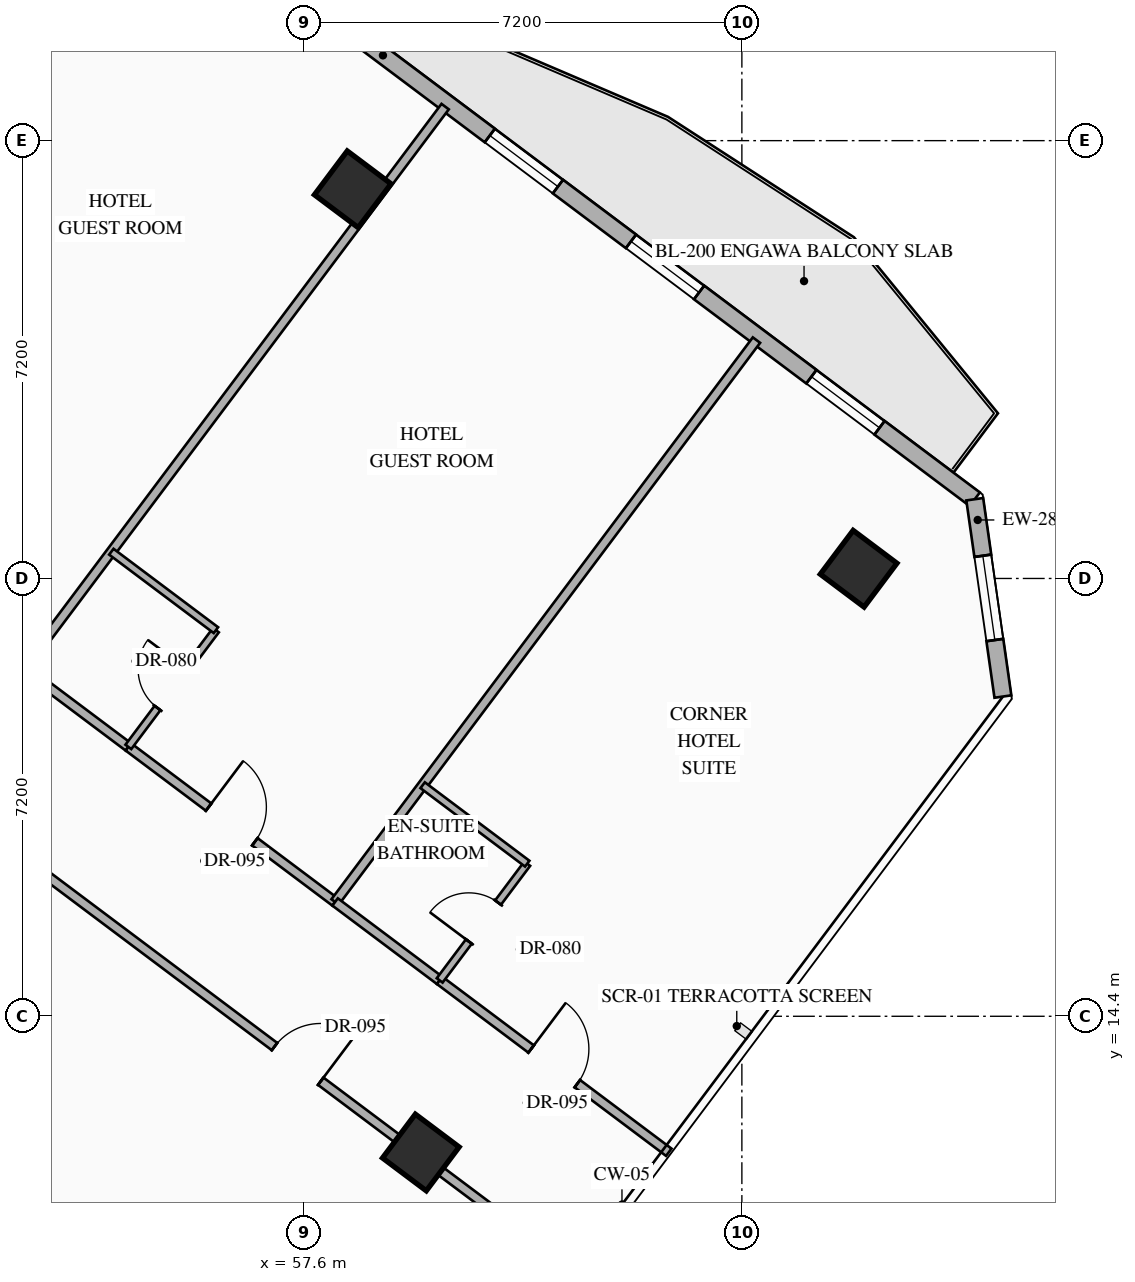
"""IFC4 building model, lengths in metres.
Left out: names, types, materials, properties, quantities, classifications, styles, units other than length and angle.
Written with IfcOpenShell. Run it as: python <this file> out.ifc"""

import sys

from ifc_helpers import new_model, si_unit, direction, frame, frame_2d, origin, origin_2d, place, context, subcontext, project, spatial, rectangle, hollow_rectangle, extrude, element, fill, save


model = new_model("IFC4")
c1 = context("Model", 3, precision=1e-05, world=origin(), true_north=direction((0.0, 1.0)))
c2 = subcontext(c1, "Body", "Model", "MODEL_VIEW")
j1 = project(units=[si_unit("LENGTHUNIT", "METRE"), si_unit("PLANEANGLEUNIT", "RADIAN")], contexts=[c1])
p1 = place(None, origin())
s1 = spatial("IfcSite", under=j1, at=p1, CompositionType="ELEMENT")
p2 = place(p1, origin())
s2 = spatial("IfcBuilding", under=s1, at=p2, CompositionType="ELEMENT")
p3 = place(p2, frame((0.0, 0.0, 70.1)))
s3 = spatial("IfcBuildingStorey", under=s2, at=p3, CompositionType="ELEMENT", Elevation=70.1)
for number, where, z_axis, x_axis in (
    (1, (58.4, 28.0, 0.0), (0.0, 0.0, 1.0), (0.8, -0.6, 0.0)),
    (2, (66.72, 21.76, 0.0), (0.0, 0.0, 1.0), (0.8, -0.6, 0.0)),
    (3, (59.52, 12.16, 0.0), (0.0, 0.0, 1.0), (0.8, -0.6, 0.0)),
):
    element("IfcColumn", number, at=place(p3, frame(where, z_axis=z_axis, x_axis=x_axis)), inside=s3, PredefinedType="COLUMN", context=c2, shape_type="SweptSolid", body=[
        extrude(hollow_rectangle(XDim=0.9, YDim=0.9, WallThickness=0.036, at=origin_2d()), origin(), (0.0, 0.0, 1.0), 4.5),
    ])
p4 = place(p3, frame((44.86, 40.73, 0.0), z_axis=(0.0, 0.0, 1.0), x_axis=(0.800006902154, -0.599990797017, 0.0)))
e4 = element("IfcWall", 4, at=p4, inside=s3, PredefinedType="STANDARD", context=c2, shape_type="SweptSolid", body=[
    extrude(rectangle(XDim=29.712, YDim=0.28, at=frame_2d((14.856, 0.0))), origin(), (0.0, 0.0, 1.0), 4.28),
])
p5 = place(p4, frame((14.249, 0.0, 0.0)))
e5 = element("IfcOpeningElement", 5, at=p5, cuts=e4, PredefinedType="OPENING", context=c2, shape_type="SweptSolid", body=[
    extrude(rectangle(XDim=1.1, YDim=2.2, at=frame_2d((0.55, 1.1))), frame((0.0, 0.15, 0.0), z_axis=(0.0, -1.0, 0.0), x_axis=(1.0, 0.0, 0.0)), (0.0, 0.0, 1.0), 0.3),
])
p6 = place(p4, frame((1.612, 0.0, 0.85)))
e6 = element("IfcOpeningElement", 6, at=p6, cuts=e4, PredefinedType="OPENING", context=c2, shape_type="SweptSolid", body=[
    extrude(rectangle(XDim=1.4, YDim=1.8, at=frame_2d((0.7, 0.9))), frame((0.0, 0.15, 0.0), z_axis=(0.0, -1.0, 0.0), x_axis=(1.0, 0.0, 0.0)), (0.0, 0.0, 1.0), 0.3),
])
p7 = place(p4, frame((5.667, 0.0, 0.85)))
e7 = element("IfcOpeningElement", 7, at=p7, cuts=e4, PredefinedType="OPENING", context=c2, shape_type="SweptSolid", body=[
    extrude(rectangle(XDim=1.4, YDim=1.8, at=frame_2d((0.7, 0.9))), frame((0.0, 0.15, 0.0), z_axis=(0.0, -1.0, 0.0), x_axis=(1.0, 0.0, 0.0)), (0.0, 0.0, 1.0), 0.3),
])
p8 = place(p4, frame((9.912, 0.0, 0.85)))
e8 = element("IfcOpeningElement", 8, at=p8, cuts=e4, PredefinedType="OPENING", context=c2, shape_type="SweptSolid", body=[
    extrude(rectangle(XDim=1.4, YDim=1.8, at=frame_2d((0.7, 0.9))), frame((0.0, 0.15, 0.0), z_axis=(0.0, -1.0, 0.0), x_axis=(1.0, 0.0, 0.0)), (0.0, 0.0, 1.0), 0.3),
])
p9 = place(p4, frame((19.743, 0.0, 0.85)))
e9 = element("IfcOpeningElement", 9, at=p9, cuts=e4, PredefinedType="OPENING", context=c2, shape_type="SweptSolid", body=[
    extrude(rectangle(XDim=1.4, YDim=1.8, at=frame_2d((0.7, 0.9))), frame((0.0, 0.15, 0.0), z_axis=(0.0, -1.0, 0.0), x_axis=(1.0, 0.0, 0.0)), (0.0, 0.0, 1.0), 0.3),
])
p10 = place(p4, frame((22.645, 0.0, 0.85)))
e10 = element("IfcOpeningElement", 10, at=p10, cuts=e4, PredefinedType="OPENING", context=c2, shape_type="SweptSolid", body=[
    extrude(rectangle(XDim=1.4, YDim=1.8, at=frame_2d((0.7, 0.9))), frame((0.0, 0.15, 0.0), z_axis=(0.0, -1.0, 0.0), x_axis=(1.0, 0.0, 0.0)), (0.0, 0.0, 1.0), 0.3),
])
p11 = place(p4, frame((26.354, 0.0, 0.85)))
e11 = element("IfcOpeningElement", 11, at=p11, cuts=e4, PredefinedType="OPENING", context=c2, shape_type="SweptSolid", body=[
    extrude(rectangle(XDim=1.4, YDim=1.8, at=frame_2d((0.7, 0.9))), frame((0.0, 0.15, 0.0), z_axis=(0.0, -1.0, 0.0), x_axis=(1.0, 0.0, 0.0)), (0.0, 0.0, 1.0), 0.3),
])
p12 = place(p3, frame((68.63, 22.903, 0.0), z_axis=(0.0, 0.0, 1.0), x_axis=(0.141285803956, -0.989968848803, 0.0)))
e12 = element("IfcWall", 12, at=p12, inside=s3, PredefinedType="STANDARD", context=c2, shape_type="SweptSolid", body=[
    extrude(rectangle(XDim=3.278, YDim=0.28, at=frame_2d((1.639, 0.0))), origin(), (0.0, 0.0, 1.0), 4.28),
])
p13 = place(p12, frame((0.939, 0.0, 0.85)))
e13 = element("IfcOpeningElement", 13, at=p13, cuts=e12, PredefinedType="OPENING", context=c2, shape_type="SweptSolid", body=[
    extrude(rectangle(XDim=1.4, YDim=1.8, at=frame_2d((0.7, 0.9))), frame((0.0, 0.15, 0.0), z_axis=(0.0, -1.0, 0.0), x_axis=(1.0, 0.0, 0.0)), (0.0, 0.0, 1.0), 0.3),
])
for number, where, z_axis, x_axis in (
    (14, (47.87, 23.96, 0.0), (0.0, 0.0, 1.0), (0.6, 0.8, 0.0)),
    (15, (52.99, 20.12, 0.0), (0.0, 0.0, 1.0), (0.6, 0.8, 0.0)),
):
    element("IfcWall", number, at=place(p3, frame(where, z_axis=z_axis, x_axis=x_axis)), inside=s3, PredefinedType="PARTITIONING", context=c2, shape_type="SweptSolid", body=[
        extrude(rectangle(XDim=11.55, YDim=0.15, at=frame_2d((5.775, 0.0))), origin(), (0.0, 0.0, 1.0), 4.28),
    ])
p14 = place(p3, frame((52.99, 20.12, 0.0), z_axis=(0.0, 0.0, 1.0), x_axis=(0.79998637334, -0.60001816845, 0.0)))
e16 = element("IfcWall", 16, at=p14, inside=s3, PredefinedType="PARTITIONING", context=c2, shape_type="SweptSolid", body=[
    extrude(rectangle(XDim=2.15, YDim=0.15, at=frame_2d((1.075, 0.0))), origin(), (0.0, 0.0, 1.0), 3.925),
])
p15 = place(p3, frame((54.71, 18.83, 0.0), z_axis=(0.0, 0.0, 1.0), x_axis=(0.800006893092, -0.599990809101, 0.0)))
e17 = element("IfcWall", 17, at=p15, inside=s3, PredefinedType="PARTITIONING", context=c2, shape_type="SweptSolid", body=[
    extrude(rectangle(XDim=4.25, YDim=0.15, at=frame_2d((2.125, 0.0))), origin(), (0.0, 0.0, 1.0), 3.925),
])
p16 = place(p15, frame((1.65, 0.0, 0.0)))
e18 = element("IfcOpeningElement", 18, at=p16, cuts=e17, PredefinedType="OPENING", context=c2, shape_type="SweptSolid", body=[
    extrude(rectangle(XDim=0.95, YDim=2.15, at=frame_2d((0.475, 1.075))), frame((0.0, 0.085, 0.0), z_axis=(0.0, -1.0, 0.0), x_axis=(1.0, 0.0, 0.0)), (0.0, 0.0, 1.0), 0.17),
])
p17 = place(p3, frame((54.71, 18.83, 0.0), z_axis=(0.0, 0.0, 1.0), x_axis=(0.6, 0.8, 0.0)))
e19 = element("IfcWall", 19, at=p17, inside=s3, PredefinedType="PARTITIONING", context=c2, shape_type="SweptSolid", body=[
    extrude(rectangle(XDim=2.4, YDim=0.12, at=frame_2d((1.2, 0.0))), origin(), (0.0, 0.0, 1.0), 4.28),
])
p18 = place(p17, frame((0.8, 0.0, 0.0)))
e20 = element("IfcOpeningElement", 20, at=p18, cuts=e19, PredefinedType="OPENING", context=c2, shape_type="SweptSolid", body=[
    extrude(rectangle(XDim=0.8, YDim=2.06, at=frame_2d((0.4, 1.03))), frame((0.0, 0.07, 0.0), z_axis=(0.0, -1.0, 0.0), x_axis=(1.0, 0.0, 0.0)), (0.0, 0.0, 1.0), 0.14),
])
p19 = place(p3, frame((54.43, 22.04, 0.0), z_axis=(0.0, 0.0, 1.0), x_axis=(0.79998637334, -0.60001816845, 0.0)))
e21 = element("IfcWall", 21, at=p19, inside=s3, PredefinedType="PARTITIONING", context=c2, shape_type="SweptSolid", body=[
    extrude(rectangle(XDim=2.15, YDim=0.12, at=frame_2d((1.075, 0.0))), origin(), (0.0, 0.0, 1.0), 4.28),
])
p20 = place(p3, frame((58.11, 16.28, 0.0), z_axis=(0.0, 0.0, 1.0), x_axis=(0.599996617946, 0.80000253653, 0.0)))
e22 = element("IfcWall", 22, at=p20, inside=s3, PredefinedType="PARTITIONING", context=c2, shape_type="SweptSolid", body=[
    extrude(rectangle(XDim=11.55, YDim=0.15, at=frame_2d((5.775, 0.0))), origin(), (0.0, 0.0, 1.0), 4.28),
])
p21 = place(p3, frame((58.11, 16.28, 0.0), z_axis=(0.0, 0.0, 1.0), x_axis=(0.79998637334, -0.60001816845, 0.0)))
e23 = element("IfcWall", 23, at=p21, inside=s3, PredefinedType="PARTITIONING", context=c2, shape_type="SweptSolid", body=[
    extrude(rectangle(XDim=2.15, YDim=0.15, at=frame_2d((1.075, 0.0))), origin(), (0.0, 0.0, 1.0), 3.925),
])
p22 = place(p3, frame((59.83, 14.99, 0.0), z_axis=(0.0, 0.0, 1.0), x_axis=(0.799993779569, -0.600008293819, 0.0)))
e24 = element("IfcWall", 24, at=p22, inside=s3, PredefinedType="PARTITIONING", context=c2, shape_type="SweptSolid", body=[
    extrude(rectangle(XDim=4.71, YDim=0.15, at=frame_2d((2.355, 0.0))), origin(), (0.0, 0.0, 1.0), 3.925),
])
p23 = place(p22, frame((1.88, 0.0, 0.0)))
e25 = element("IfcOpeningElement", 25, at=p23, cuts=e24, PredefinedType="OPENING", context=c2, shape_type="SweptSolid", body=[
    extrude(rectangle(XDim=0.95, YDim=2.15, at=frame_2d((0.475, 1.075))), frame((0.0, 0.085, 0.0), z_axis=(0.0, -1.0, 0.0), x_axis=(1.0, 0.0, 0.0)), (0.0, 0.0, 1.0), 0.17),
])
p24 = place(p3, frame((59.83, 14.99, 0.0), z_axis=(0.0, 0.0, 1.0), x_axis=(0.6, 0.8, 0.0)))
e26 = element("IfcWall", 26, at=p24, inside=s3, PredefinedType="PARTITIONING", context=c2, shape_type="SweptSolid", body=[
    extrude(rectangle(XDim=2.4, YDim=0.12, at=frame_2d((1.2, 0.0))), origin(), (0.0, 0.0, 1.0), 4.28),
])
p25 = place(p24, frame((0.8, 0.0, 0.0)))
e27 = element("IfcOpeningElement", 27, at=p25, cuts=e26, PredefinedType="OPENING", context=c2, shape_type="SweptSolid", body=[
    extrude(rectangle(XDim=0.8, YDim=2.06, at=frame_2d((0.4, 1.03))), frame((0.0, 0.07, 0.0), z_axis=(0.0, -1.0, 0.0), x_axis=(1.0, 0.0, 0.0)), (0.0, 0.0, 1.0), 0.14),
])
p26 = place(p3, frame((59.55, 18.2, 0.0), z_axis=(0.0, 0.0, 1.0), x_axis=(0.79998637334, -0.60001816845, 0.0)))
e28 = element("IfcWall", 28, at=p26, inside=s3, PredefinedType="PARTITIONING", context=c2, shape_type="SweptSolid", body=[
    extrude(rectangle(XDim=2.15, YDim=0.12, at=frame_2d((1.075, 0.0))), origin(), (0.0, 0.0, 1.0), 4.28),
])
p27 = place(p3, frame((52.89, 17.07, 0.0), z_axis=(0.0, 0.0, 1.0), x_axis=(0.8, -0.6, 0.0)))
e29 = element("IfcWall", 29, at=p27, inside=s3, PredefinedType="PARTITIONING", context=c2, shape_type="SweptSolid", body=[
    extrude(rectangle(XDim=11.51, YDim=0.15, at=frame_2d((5.755, 0.0))), origin(), (0.0, 0.0, 1.0), 3.475),
])
p28 = place(p27, frame((5.28, 0.0, 0.0)))
e30 = element("IfcOpeningElement", 30, at=p28, cuts=e29, PredefinedType="OPENING", context=c2, shape_type="SweptSolid", body=[
    extrude(rectangle(XDim=0.95, YDim=2.15, at=frame_2d((0.475, 1.075))), frame((0.0, 0.085, 0.0), z_axis=(0.0, -1.0, 0.0), x_axis=(1.0, 0.0, 0.0)), (0.0, 0.0, 1.0), 0.17),
])
p29 = place(p9, origin())
e31 = element("IfcWindow", 31, at=p29, inside=s3, PartitioningType="SINGLE_PANEL", PredefinedType="WINDOW", context=c2, shape_type="SweptSolid", body=[
    extrude(rectangle(XDim=1.4, YDim=1.8, at=frame_2d((0.7, 0.9))), frame((0.0, 0.03, 0.0), z_axis=(0.0, -1.0, 0.0), x_axis=(1.0, 0.0, 0.0)), (0.0, 0.0, 1.0), 0.06),
])
fill(e9, e31)
p30 = place(p10, origin())
e32 = element("IfcWindow", 32, at=p30, inside=s3, PartitioningType="SINGLE_PANEL", PredefinedType="WINDOW", context=c2, shape_type="SweptSolid", body=[
    extrude(rectangle(XDim=1.4, YDim=1.8, at=frame_2d((0.7, 0.9))), frame((0.0, 0.03, 0.0), z_axis=(0.0, -1.0, 0.0), x_axis=(1.0, 0.0, 0.0)), (0.0, 0.0, 1.0), 0.06),
])
fill(e10, e32)
p31 = place(p11, origin())
e33 = element("IfcWindow", 33, at=p31, inside=s3, PartitioningType="SINGLE_PANEL", PredefinedType="WINDOW", context=c2, shape_type="SweptSolid", body=[
    extrude(rectangle(XDim=1.4, YDim=1.8, at=frame_2d((0.7, 0.9))), frame((0.0, 0.03, 0.0), z_axis=(0.0, -1.0, 0.0), x_axis=(1.0, 0.0, 0.0)), (0.0, 0.0, 1.0), 0.06),
])
fill(e11, e33)
p32 = place(p13, origin())
e34 = element("IfcWindow", 34, at=p32, inside=s3, PartitioningType="SINGLE_PANEL", PredefinedType="WINDOW", context=c2, shape_type="SweptSolid", body=[
    extrude(rectangle(XDim=1.4, YDim=1.8, at=frame_2d((0.7, 0.9))), frame((0.0, 0.03, 0.0), z_axis=(0.0, -1.0, 0.0), x_axis=(1.0, 0.0, 0.0)), (0.0, 0.0, 1.0), 0.06),
])
fill(e13, e34)
p33 = place(p16, origin())
e35 = element("IfcDoor", 35, at=p33, inside=s3, OperationType="SINGLE_SWING_LEFT", PredefinedType="DOOR", context=c2, shape_type="SweptSolid", body=[
    extrude(rectangle(XDim=0.95, YDim=2.15, at=frame_2d((0.475, 1.075))), frame((0.0, 0.025, 0.0), z_axis=(0.0, -1.0, 0.0), x_axis=(1.0, 0.0, 0.0)), (0.0, 0.0, 1.0), 0.05),
])
fill(e18, e35)
p34 = place(p18, origin())
e36 = element("IfcDoor", 36, at=p34, inside=s3, OperationType="SINGLE_SWING_RIGHT", PredefinedType="DOOR", context=c2, shape_type="SweptSolid", body=[
    extrude(rectangle(XDim=0.8, YDim=2.06, at=frame_2d((0.4, 1.03))), frame((0.0, 0.025, 0.0), z_axis=(0.0, -1.0, 0.0), x_axis=(1.0, 0.0, 0.0)), (0.0, 0.0, 1.0), 0.05),
])
fill(e20, e36)
p35 = place(p23, origin())
e37 = element("IfcDoor", 37, at=p35, inside=s3, OperationType="SINGLE_SWING_LEFT", PredefinedType="DOOR", context=c2, shape_type="SweptSolid", body=[
    extrude(rectangle(XDim=0.95, YDim=2.15, at=frame_2d((0.475, 1.075))), frame((0.0, 0.025, 0.0), z_axis=(0.0, -1.0, 0.0), x_axis=(1.0, 0.0, 0.0)), (0.0, 0.0, 1.0), 0.05),
])
fill(e25, e37)
p36 = place(p25, origin())
e38 = element("IfcDoor", 38, at=p36, inside=s3, OperationType="SINGLE_SWING_LEFT", PredefinedType="DOOR", context=c2, shape_type="SweptSolid", body=[
    extrude(rectangle(XDim=0.8, YDim=2.06, at=frame_2d((0.4, 1.03))), frame((0.0, 0.025, 0.0), z_axis=(0.0, -1.0, 0.0), x_axis=(1.0, 0.0, 0.0)), (0.0, 0.0, 1.0), 0.05),
])
fill(e27, e38)
p37 = place(p28, origin())
e39 = element("IfcDoor", 39, at=p37, inside=s3, OperationType="SINGLE_SWING_RIGHT", PredefinedType="DOOR", context=c2, shape_type="SweptSolid", body=[
    extrude(rectangle(XDim=0.95, YDim=2.15, at=frame_2d((0.475, 1.075))), frame((0.0, 0.025, 0.0), z_axis=(0.0, -1.0, 0.0), x_axis=(1.0, 0.0, 0.0)), (0.0, 0.0, 1.0), 0.05),
])
fill(e30, e39)
save(model, sys.argv[1])
